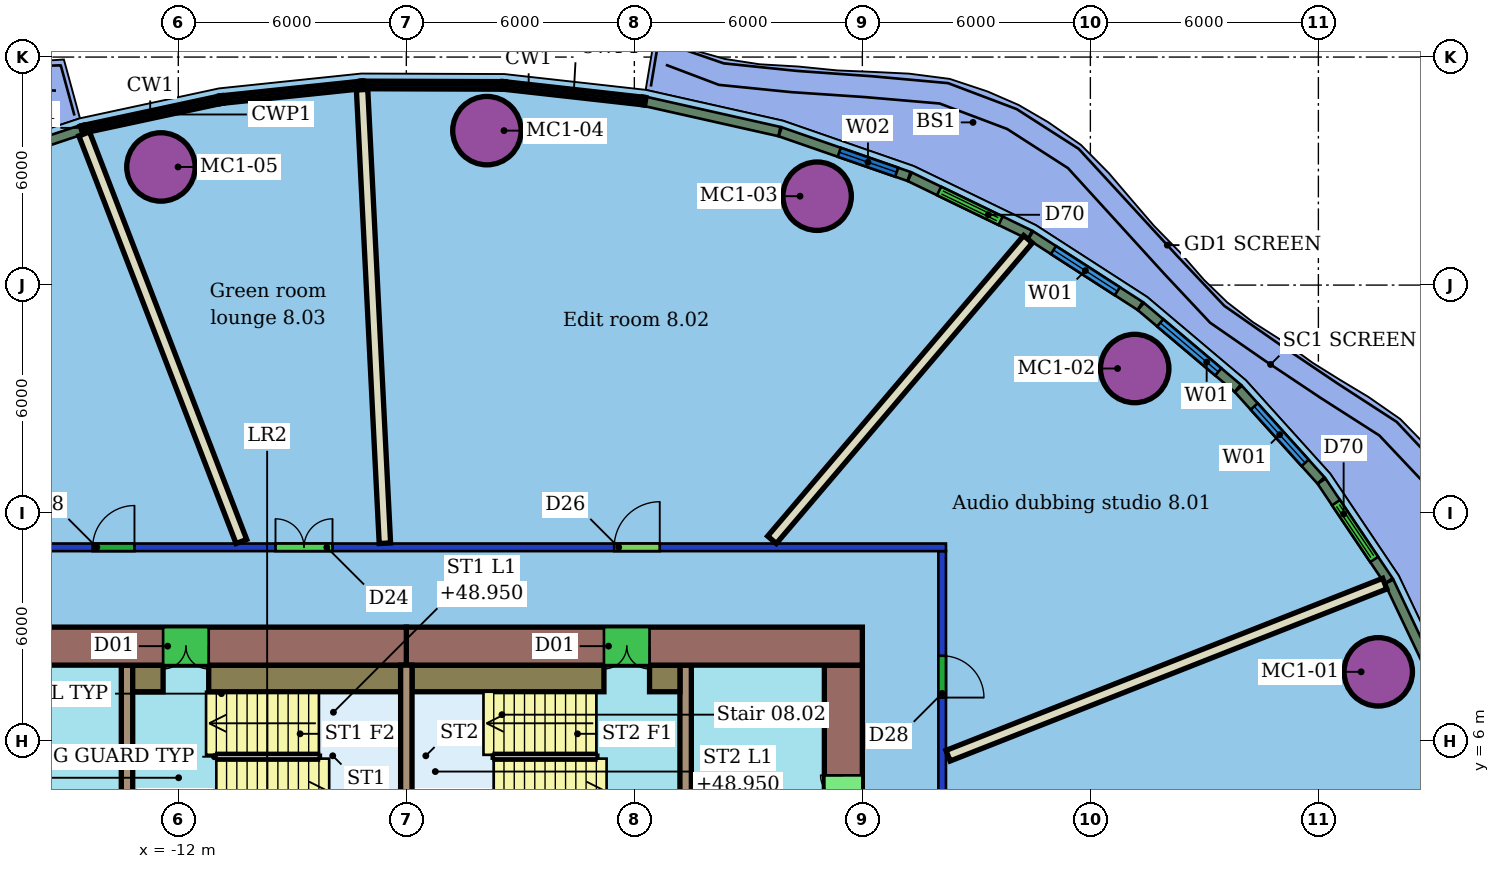
"""IFC4 building model, lengths in metres.
Left out: names, types, materials, properties, quantities, classifications, styles, units other than length and angle.
Written with IfcOpenShell. Run it as: python <this file> out.ifc"""

import sys

from ifc_helpers import new_model, si_unit, direction, frame, frame_2d, origin, origin_2d, place, context, subcontext, project, spatial, rectangle, hollow_circle, extrude, element, fill, save


model = new_model("IFC4")
c1 = context("Model", 3, precision=1e-05, world=origin(), true_north=direction((0.0, 1.0)))
c2 = subcontext(c1, "Body", "Model", "MODEL_VIEW")
j1 = project(units=[si_unit("LENGTHUNIT", "METRE"), si_unit("PLANEANGLEUNIT", "RADIAN")], contexts=[c1])
p1 = place(None, origin())
s1 = spatial("IfcSite", under=j1, at=p1, CompositionType="ELEMENT")
p2 = place(p1, origin())
s2 = spatial("IfcBuilding", under=s1, at=p2, CompositionType="ELEMENT")
p3 = place(p2, frame((0.0, 0.0, 47.1)))
s3 = spatial("IfcBuildingStorey", under=s2, at=p3, CompositionType="ELEMENT", Elevation=47.1)
for number, where, z_axis, x_axis in (
    (1, (19.575, 7.824, 0.0), (0.0, 0.0, 1.0), (1.0, 0.0, 0.0)),
    (2, (13.166, 15.805, 0.0), (0.0, 0.0, 1.0), (1.0, 0.0, 0.0)),
    (3, (4.81, 20.339, 0.0), (0.0, 0.0, 1.0), (1.0, 0.0, 0.0)),
    (4, (-3.879, 22.064, 0.0), (0.0, 0.0, 1.0), (1.0, 0.0, 0.0)),
    (5, (-12.458, 21.108, 0.0), (0.0, 0.0, 1.0), (1.0, 0.0, 0.0)),
):
    element("IfcColumn", number, at=place(p3, frame(where, z_axis=z_axis, x_axis=x_axis)), inside=s3, PredefinedType="COLUMN", context=c2, shape_type="SweptSolid", body=[
        extrude(hollow_circle(Radius=0.9, WallThickness=0.06, at=origin_2d()), origin(), (0.0, 0.0, 1.0), 3.55),
    ])
p4 = place(p3, frame((-20.2, 11.1, 0.0), z_axis=(0.0, 0.0, 1.0), x_axis=(1.0, 0.0, 0.0)))
e6 = element("IfcWall", 6, at=p4, inside=s3, PredefinedType="PARTITIONING", context=c2, shape_type="SweptSolid", body=[
    extrude(rectangle(XDim=28.4, YDim=0.2, at=frame_2d((14.2, 0.0))), origin(), (0.0, 0.0, 1.0), 2.85),
])
p5 = place(p4, frame((19.669, 0.0, 0.0)))
e7 = element("IfcOpeningElement", 7, at=p5, cuts=e6, PredefinedType="OPENING", context=c2, shape_type="SweptSolid", body=[
    extrude(rectangle(XDim=1.2, YDim=2.1, at=frame_2d((0.6, 1.05))), frame((0.0, 0.11, 0.0), z_axis=(0.0, -1.0, 0.0), x_axis=(1.0, 0.0, 0.0)), (0.0, 0.0, 1.0), 0.22),
])
p6 = place(p4, frame((10.757, 0.0, 0.0)))
e8 = element("IfcOpeningElement", 8, at=p6, cuts=e6, PredefinedType="OPENING", context=c2, shape_type="SweptSolid", body=[
    extrude(rectangle(XDim=1.5, YDim=2.1, at=frame_2d((0.75, 1.05))), frame((0.0, 0.11, 0.0), z_axis=(0.0, -1.0, 0.0), x_axis=(1.0, 0.0, 0.0)), (0.0, 0.0, 1.0), 0.22),
])
p7 = place(p4, frame((5.946, 0.0, 0.0)))
e9 = element("IfcOpeningElement", 9, at=p7, cuts=e6, PredefinedType="OPENING", context=c2, shape_type="SweptSolid", body=[
    extrude(rectangle(XDim=1.1, YDim=2.1, at=frame_2d((0.55, 1.05))), frame((0.0, 0.11, 0.0), z_axis=(0.0, -1.0, 0.0), x_axis=(1.0, 0.0, 0.0)), (0.0, 0.0, 1.0), 0.22),
])
p8 = place(p3, frame((8.1, 11.0, 0.0), z_axis=(0.0, 0.0, 1.0), x_axis=(0.0, -1.0, 0.0)))
e10 = element("IfcWall", 10, at=p8, inside=s3, PredefinedType="PARTITIONING", context=c2, shape_type="SweptSolid", body=[
    extrude(rectangle(XDim=22.0, YDim=0.2, at=frame_2d((11.0, 0.0))), origin(), (0.0, 0.0, 1.0), 2.85),
])
p9 = place(p8, frame((2.753, 0.0, 0.0)))
e11 = element("IfcOpeningElement", 11, at=p9, cuts=e10, PredefinedType="OPENING", context=c2, shape_type="SweptSolid", body=[
    extrude(rectangle(XDim=1.1, YDim=2.1, at=frame_2d((0.55, 1.05))), frame((0.0, 0.11, 0.0), z_axis=(0.0, -1.0, 0.0), x_axis=(1.0, 0.0, 0.0)), (0.0, 0.0, 1.0), 0.22),
])
p10 = place(p8, frame((15.639, 0.0, 0.0)))
e12 = element("IfcOpeningElement", 12, at=p10, cuts=e10, PredefinedType="OPENING", context=c2, shape_type="SweptSolid", body=[
    extrude(rectangle(XDim=1.8, YDim=2.1, at=frame_2d((0.9, 1.05))), frame((0.0, 0.11, 0.0), z_axis=(0.0, -1.0, 0.0), x_axis=(1.0, 0.0, 0.0)), (0.0, 0.0, 1.0), 0.22),
])
p11 = place(p8, frame((7.72, 0.0, 0.0)))
e13 = element("IfcOpeningElement", 13, at=p11, cuts=e10, PredefinedType="OPENING", context=c2, shape_type="SweptSolid", body=[
    extrude(rectangle(XDim=0.9, YDim=2.1, at=frame_2d((0.45, 1.05))), frame((0.0, 0.11, 0.0), z_axis=(0.0, -1.0, 0.0), x_axis=(1.0, 0.0, 0.0)), (0.0, 0.0, 1.0), 0.22),
])
p12 = place(p3, frame((19.747, 10.144, 0.0), z_axis=(0.0, 0.0, 1.0), x_axis=(-0.930393072446, -0.366563406172, 0.0)))
e14 = element("IfcWall", 14, at=p12, inside=s3, PredefinedType="PARTITIONING", context=c2, shape_type="SweptSolid", body=[
    extrude(rectangle(XDim=12.352, YDim=0.3, at=frame_2d((6.176, 0.0))), origin(), (0.0, 0.0, 1.0), 3.55),
])
p13 = place(p3, frame((10.359, 19.206, 0.0), z_axis=(0.0, 0.0, 1.0), x_axis=(-0.648427112799, -0.76127674297, 0.0)))
e15 = element("IfcWall", 15, at=p13, inside=s3, PredefinedType="PARTITIONING", context=c2, shape_type="SweptSolid", body=[
    extrude(rectangle(XDim=10.389, YDim=0.3, at=frame_2d((5.194, 0.0))), origin(), (0.0, 0.0, 1.0), 3.55),
])
p14 = place(p3, frame((-7.164, 23.142, 0.0), z_axis=(0.0, 0.0, 1.0), x_axis=(0.050261666174, -0.998736083714, 0.0)))
e16 = element("IfcWall", 16, at=p14, inside=s3, PredefinedType="PARTITIONING", context=c2, shape_type="SweptSolid", body=[
    extrude(rectangle(XDim=11.949, YDim=0.3, at=frame_2d((5.975, 0.0))), origin(), (0.0, 0.0, 1.0), 3.55),
])
p15 = place(p3, frame((-14.477, 21.979, 0.0), z_axis=(0.0, 0.0, 1.0), x_axis=(0.359841429266, -0.933013475671, 0.0)))
e17 = element("IfcWall", 17, at=p15, inside=s3, PredefinedType="PARTITIONING", context=c2, shape_type="SweptSolid", body=[
    extrude(rectangle(XDim=11.495, YDim=0.3, at=frame_2d((5.747, 0.0))), origin(), (0.0, 0.0, 1.0), 3.55),
])
p16 = place(p3, frame((21.168, 7.439, 0.0), z_axis=(0.0, 0.0, 1.0), x_axis=(-0.428609341076, 0.903489918451, 0.0)))
e18 = element("IfcWall", 18, at=p16, inside=s3, PredefinedType="SOLIDWALL", context=c2, shape_type="SweptSolid", body=[
    extrude(rectangle(XDim=3.05, YDim=0.25, at=frame_2d((1.525, 0.0))), origin(), (0.0, 0.0, 1.0), 3.15),
])
p17 = place(p3, frame((19.848, 10.217, 0.0), z_axis=(0.0, 0.0, 1.0), x_axis=(-0.558028768247, 0.829821603605, 0.0)))
e19 = element("IfcWall", 19, at=p17, inside=s3, PredefinedType="SOLIDWALL", context=c2, shape_type="SweptSolid", body=[
    extrude(rectangle(XDim=3.161, YDim=0.25, at=frame_2d((1.581, 0.0))), origin(), (0.0, 0.0, 1.0), 3.15),
])
p18 = place(p17, frame((0.68, 0.0, 0.0)))
e20 = element("IfcOpeningElement", 20, at=p18, cuts=e19, PredefinedType="OPENING", context=c2, shape_type="SweptSolid", body=[
    extrude(rectangle(XDim=1.8, YDim=2.4, at=frame_2d((0.9, 1.2))), frame((0.0, 0.135, 0.0), z_axis=(0.0, -1.0, 0.0), x_axis=(1.0, 0.0, 0.0)), (0.0, 0.0, 1.0), 0.27),
])
p19 = place(p3, frame((18.068, 12.861, 0.0), z_axis=(0.0, 0.0, 1.0), x_axis=(-0.670103092784, 0.742268041237, 0.0)))
e21 = element("IfcWall", 21, at=p19, inside=s3, PredefinedType="SOLIDWALL", context=c2, shape_type="SweptSolid", body=[
    extrude(rectangle(XDim=3.244, YDim=0.25, at=frame_2d((1.622, 0.0))), origin(), (0.0, 0.0, 1.0), 3.15),
])
p20 = place(p19, frame((0.622, 0.0, 0.8)))
e22 = element("IfcOpeningElement", 22, at=p20, cuts=e21, PredefinedType="OPENING", context=c2, shape_type="SweptSolid", body=[
    extrude(rectangle(XDim=2.0, YDim=2.2, at=frame_2d((1.0, 1.1))), frame((0.0, 0.135, 0.0), z_axis=(0.0, -1.0, 0.0), x_axis=(1.0, 0.0, 0.0)), (0.0, 0.0, 1.0), 0.27),
])
p21 = place(p3, frame((15.876, 15.286, 0.0), z_axis=(0.0, 0.0, 1.0), x_axis=(-0.764082841582, 0.645118137398, 0.0)))
e23 = element("IfcWall", 23, at=p21, inside=s3, PredefinedType="SOLIDWALL", context=c2, shape_type="SweptSolid", body=[
    extrude(rectangle(XDim=3.335, YDim=0.25, at=frame_2d((1.667, 0.0))), origin(), (0.0, 0.0, 1.0), 3.15),
])
p22 = place(p21, frame((0.667, 0.0, 0.8)))
e24 = element("IfcOpeningElement", 24, at=p22, cuts=e23, PredefinedType="OPENING", context=c2, shape_type="SweptSolid", body=[
    extrude(rectangle(XDim=2.0, YDim=2.2, at=frame_2d((1.0, 1.1))), frame((0.0, 0.135, 0.0), z_axis=(0.0, -1.0, 0.0), x_axis=(1.0, 0.0, 0.0)), (0.0, 0.0, 1.0), 0.27),
])
p23 = place(p3, frame((13.309, 17.452, 0.0), z_axis=(0.0, 0.0, 1.0), x_axis=(-0.840374130765, 0.54200675304, 0.0)))
e25 = element("IfcWall", 25, at=p23, inside=s3, PredefinedType="SOLIDWALL", context=c2, shape_type="SweptSolid", body=[
    extrude(rectangle(XDim=3.426, YDim=0.25, at=frame_2d((1.713, 0.0))), origin(), (0.0, 0.0, 1.0), 3.15),
])
p24 = place(p23, frame((0.713, 0.0, 0.8)))
e26 = element("IfcOpeningElement", 26, at=p24, cuts=e25, PredefinedType="OPENING", context=c2, shape_type="SweptSolid", body=[
    extrude(rectangle(XDim=2.0, YDim=2.2, at=frame_2d((1.0, 1.1))), frame((0.0, 0.135, 0.0), z_axis=(0.0, -1.0, 0.0), x_axis=(1.0, 0.0, 0.0)), (0.0, 0.0, 1.0), 0.27),
])
p25 = place(p3, frame((10.409, 19.32, 0.0), z_axis=(0.0, 0.0, 1.0), x_axis=(-0.900150457919, 0.435579100862, 0.0)))
e27 = element("IfcWall", 27, at=p25, inside=s3, PredefinedType="SOLIDWALL", context=c2, shape_type="SweptSolid", body=[
    extrude(rectangle(XDim=3.511, YDim=0.25, at=frame_2d((1.756, 0.0))), origin(), (0.0, 0.0, 1.0), 3.15),
])
p26 = place(p25, frame((0.856, 0.0, 0.0)))
e28 = element("IfcOpeningElement", 28, at=p26, cuts=e27, PredefinedType="OPENING", context=c2, shape_type="SweptSolid", body=[
    extrude(rectangle(XDim=1.8, YDim=2.4, at=frame_2d((0.9, 1.2))), frame((0.0, 0.135, 0.0), z_axis=(0.0, -1.0, 0.0), x_axis=(1.0, 0.0, 0.0)), (0.0, 0.0, 1.0), 0.27),
])
p27 = place(p3, frame((7.227, 20.858, 0.0), z_axis=(0.0, 0.0, 1.0), x_axis=(-0.944816817468, 0.327599116956, 0.0)))
e29 = element("IfcWall", 29, at=p27, inside=s3, PredefinedType="SOLIDWALL", context=c2, shape_type="SweptSolid", body=[
    extrude(rectangle(XDim=3.587, YDim=0.25, at=frame_2d((1.793, 0.0))), origin(), (0.0, 0.0, 1.0), 3.15),
])
p28 = place(p27, frame((0.343, 0.0, 0.8)))
e30 = element("IfcOpeningElement", 30, at=p28, cuts=e29, PredefinedType="OPENING", context=c2, shape_type="SweptSolid", body=[
    extrude(rectangle(XDim=1.6, YDim=2.2, at=frame_2d((0.8, 1.1))), frame((0.0, 0.135, 0.0), z_axis=(0.0, -1.0, 0.0), x_axis=(1.0, 0.0, 0.0)), (0.0, 0.0, 1.0), 0.27),
])
p29 = place(p3, frame((3.817, 22.04, 0.0), z_axis=(0.0, 0.0, 1.0), x_axis=(-0.975672486329, 0.21923320784, 0.0)))
e31 = element("IfcWall", 31, at=p29, inside=s3, PredefinedType="SOLIDWALL", context=c2, shape_type="SweptSolid", body=[
    extrude(rectangle(XDim=3.603, YDim=0.25, at=frame_2d((1.801, 0.0))), origin(), (0.0, 0.0, 1.0), 3.15),
])
p30 = place(p3, frame((-14.562, 22.082, 0.0), z_axis=(0.0, 0.0, 1.0), x_axis=(-0.948744266755, -0.316044801096, 0.0)))
e32 = element("IfcWall", 32, at=p30, inside=s3, PredefinedType="SOLIDWALL", context=c2, shape_type="SweptSolid", body=[
    extrude(rectangle(XDim=3.603, YDim=0.25, at=frame_2d((1.801, 0.0))), origin(), (0.0, 0.0, 1.0), 3.15),
])
p31 = place(p3, frame((6.0, 8.5, 0.0), z_axis=(0.0, 0.0, 1.0), x_axis=(-1.0, 0.0, 0.0)))
e33 = element("IfcWall", 33, at=p31, inside=s3, PredefinedType="SHEAR", context=c2, shape_type="SweptSolid", body=[
    extrude(rectangle(XDim=12.0, YDim=1.0, at=frame_2d((6.0, 0.0))), origin(), (0.0, 0.0, 1.0), 3.4),
])
p32 = place(p31, frame((5.6, 0.0, 0.0)))
e34 = element("IfcOpeningElement", 34, at=p32, cuts=e33, PredefinedType="OPENING", context=c2, shape_type="SweptSolid", body=[
    extrude(rectangle(XDim=1.2, YDim=2.1, at=frame_2d((0.6, 1.05))), frame((0.0, 0.51, 0.0), z_axis=(0.0, -1.0, 0.0), x_axis=(1.0, 0.0, 0.0)), (0.0, 0.0, 1.0), 1.02),
])
p33 = place(p3, frame((-6.0, 8.5, 0.0), z_axis=(0.0, 0.0, 1.0), x_axis=(-1.0, 0.0, 0.0)))
e35 = element("IfcWall", 35, at=p33, inside=s3, PredefinedType="SHEAR", context=c2, shape_type="SweptSolid", body=[
    extrude(rectangle(XDim=12.0, YDim=1.0, at=frame_2d((6.0, 0.0))), origin(), (0.0, 0.0, 1.0), 3.4),
])
p34 = place(p33, frame((5.2, 0.0, 0.0)))
e36 = element("IfcOpeningElement", 36, at=p34, cuts=e35, PredefinedType="OPENING", context=c2, shape_type="SweptSolid", body=[
    extrude(rectangle(XDim=1.2, YDim=2.1, at=frame_2d((0.6, 1.05))), frame((0.0, 0.51, 0.0), z_axis=(0.0, -1.0, 0.0), x_axis=(1.0, 0.0, 0.0)), (0.0, 0.0, 1.0), 1.02),
])
p35 = place(p3, frame((5.5, -8.0, 0.0), z_axis=(0.0, 0.0, 1.0), x_axis=(0.0, 1.0, 0.0)))
e37 = element("IfcWall", 37, at=p35, inside=s3, PredefinedType="SHEAR", context=c2, shape_type="SweptSolid", body=[
    extrude(rectangle(XDim=16.0, YDim=1.0, at=frame_2d((8.0, 0.0))), origin(), (0.0, 0.0, 1.0), 3.4),
])
p36 = place(p35, frame((2.9, 0.0, 0.0)))
e38 = element("IfcOpeningElement", 38, at=p36, cuts=e37, PredefinedType="OPENING", context=c2, shape_type="SweptSolid", body=[
    extrude(rectangle(XDim=1.2, YDim=2.1, at=frame_2d((0.6, 1.05))), frame((0.0, 0.51, 0.0), z_axis=(0.0, -1.0, 0.0), x_axis=(1.0, 0.0, 0.0)), (0.0, 0.0, 1.0), 1.02),
])
p37 = place(p35, frame((11.9, 0.0, 0.0)))
e39 = element("IfcOpeningElement", 39, at=p37, cuts=e37, PredefinedType="OPENING", context=c2, shape_type="SweptSolid", body=[
    extrude(rectangle(XDim=1.2, YDim=2.1, at=frame_2d((0.6, 1.05))), frame((0.0, 0.51, 0.0), z_axis=(0.0, -1.0, 0.0), x_axis=(1.0, 0.0, 0.0)), (0.0, 0.0, 1.0), 1.02),
])
p38 = place(p3, frame((-13.35, 8.0, 0.0), z_axis=(0.0, 0.0, 1.0), x_axis=(0.0, -1.0, 0.0)))
e40 = element("IfcWall", 40, at=p38, inside=s3, PredefinedType="SHEAR", context=c2, shape_type="SweptSolid", body=[
    extrude(rectangle(XDim=16.0, YDim=0.3, at=frame_2d((8.0, 0.0))), origin(), (0.0, 0.0, 1.0), 3.4),
])
p39 = place(p38, frame((7.25, 0.0, 0.0)))
e41 = element("IfcOpeningElement", 41, at=p39, cuts=e40, PredefinedType="OPENING", context=c2, shape_type="SweptSolid", body=[
    extrude(rectangle(XDim=1.5, YDim=2.1, at=frame_2d((0.75, 1.05))), frame((0.0, 0.16, 0.0), z_axis=(0.0, -1.0, 0.0), x_axis=(1.0, 0.0, 0.0)), (0.0, 0.0, 1.0), 0.32),
])
p40 = place(p3, frame((1.35, -8.0, 0.0), z_axis=(0.0, 0.0, 1.0), x_axis=(0.0, 1.0, 0.0)))
e42 = element("IfcWall", 42, at=p40, inside=s3, PredefinedType="SHEAR", context=c2, shape_type="SweptSolid", body=[
    extrude(rectangle(XDim=16.0, YDim=0.3, at=frame_2d((8.0, 0.0))), origin(), (0.0, 0.0, 1.0), 3.4),
])
p41 = place(p40, frame((1.91, 0.0, 0.0)))
e43 = element("IfcOpeningElement", 43, at=p41, cuts=e42, PredefinedType="OPENING", context=c2, shape_type="SweptSolid", body=[
    extrude(rectangle(XDim=1.0, YDim=2.1, at=frame_2d((0.5, 1.05))), frame((0.0, 0.16, 0.0), z_axis=(0.0, -1.0, 0.0), x_axis=(1.0, 0.0, 0.0)), (0.0, 0.0, 1.0), 0.32),
])
p42 = place(p40, frame((7.25, 0.0, 0.0)))
e44 = element("IfcOpeningElement", 44, at=p42, cuts=e42, PredefinedType="OPENING", context=c2, shape_type="SweptSolid", body=[
    extrude(rectangle(XDim=1.5, YDim=2.1, at=frame_2d((0.75, 1.05))), frame((0.0, 0.16, 0.0), z_axis=(0.0, -1.0, 0.0), x_axis=(1.0, 0.0, 0.0)), (0.0, 0.0, 1.0), 0.32),
])
p43 = place(p3, frame((-6.0, 3.88, 0.0), z_axis=(0.0, 0.0, 1.0), x_axis=(0.0, 1.0, 0.0)))
e45 = element("IfcWall", 45, at=p43, inside=s3, PredefinedType="SHEAR", context=c2, shape_type="SweptSolid", body=[
    extrude(rectangle(XDim=4.12, YDim=0.3, at=frame_2d((2.06, 0.0))), origin(), (0.0, 0.0, 1.0), 3.4),
])
p44 = place(p3, frame((-13.2, 7.65, 0.0), z_axis=(0.0, 0.0, 1.0), x_axis=(1.0, 0.0, 0.0)))
e46 = element("IfcWall", 46, at=p44, inside=s3, PredefinedType="SHEAR", context=c2, shape_type="SweptSolid", body=[
    extrude(rectangle(XDim=0.8, YDim=0.7, at=frame_2d((0.4, 0.0))), origin(), (0.0, 0.0, 1.0), 3.4),
])
for number, where, z_axis, x_axis in (
    (47, (-11.2, 7.65, 0.0), (0.0, 0.0, 1.0), (1.0, 0.0, 0.0)),
    (48, (-5.85, 7.65, 0.0), (0.0, 0.0, 1.0), (1.0, 0.0, 0.0)),
):
    element("IfcWall", number, at=place(p3, frame(where, z_axis=z_axis, x_axis=x_axis)), inside=s3, PredefinedType="SHEAR", context=c2, shape_type="SweptSolid", body=[
        extrude(rectangle(XDim=5.05, YDim=0.7, at=frame_2d((2.525, 0.0))), origin(), (0.0, 0.0, 1.0), 3.4),
    ])
p45 = place(p3, frame((0.4, 7.65, 0.0), z_axis=(0.0, 0.0, 1.0), x_axis=(1.0, 0.0, 0.0)))
e49 = element("IfcWall", 49, at=p45, inside=s3, PredefinedType="SHEAR", context=c2, shape_type="SweptSolid", body=[
    extrude(rectangle(XDim=0.8, YDim=0.7, at=frame_2d((0.4, 0.0))), origin(), (0.0, 0.0, 1.0), 3.4),
])
p46 = place(p9, origin())
e50 = element("IfcDoor", 50, at=p46, inside=s3, OperationType="SINGLE_SWING_RIGHT", PredefinedType="DOOR", context=c2, shape_type="SweptSolid", body=[
    extrude(rectangle(XDim=1.1, YDim=2.1, at=frame_2d((0.55, 1.05))), frame((0.0, 0.025, 0.0), z_axis=(0.0, -1.0, 0.0), x_axis=(1.0, 0.0, 0.0)), (0.0, 0.0, 1.0), 0.05),
])
fill(e11, e50)
p47 = place(p5, origin())
e51 = element("IfcDoor", 51, at=p47, inside=s3, OperationType="SINGLE_SWING_RIGHT", PredefinedType="DOOR", context=c2, shape_type="SweptSolid", body=[
    extrude(rectangle(XDim=1.2, YDim=2.1, at=frame_2d((0.6, 1.05))), frame((0.0, 0.025, 0.0), z_axis=(0.0, -1.0, 0.0), x_axis=(1.0, 0.0, 0.0)), (0.0, 0.0, 1.0), 0.05),
])
fill(e7, e51)
p48 = place(p6, origin())
e52 = element("IfcDoor", 52, at=p48, inside=s3, OperationType="DOUBLE_DOOR_SINGLE_SWING", PredefinedType="DOOR", context=c2, shape_type="SweptSolid", body=[
    extrude(rectangle(XDim=1.5, YDim=2.1, at=frame_2d((0.75, 1.05))), frame((0.0, 0.025, 0.0), z_axis=(0.0, -1.0, 0.0), x_axis=(1.0, 0.0, 0.0)), (0.0, 0.0, 1.0), 0.05),
])
fill(e8, e52)
p49 = place(p7, origin())
e53 = element("IfcDoor", 53, at=p49, inside=s3, OperationType="SINGLE_SWING_RIGHT", PredefinedType="DOOR", context=c2, shape_type="SweptSolid", body=[
    extrude(rectangle(XDim=1.1, YDim=2.1, at=frame_2d((0.55, 1.05))), frame((0.0, 0.025, 0.0), z_axis=(0.0, -1.0, 0.0), x_axis=(1.0, 0.0, 0.0)), (0.0, 0.0, 1.0), 0.05),
])
fill(e9, e53)
p50 = place(p18, origin())
e54 = element("IfcDoor", 54, at=p50, inside=s3, OperationType="DOUBLE_DOOR_SLIDING", PredefinedType="DOOR", context=c2, shape_type="SweptSolid", body=[
    extrude(rectangle(XDim=1.8, YDim=2.4, at=frame_2d((0.9, 1.2))), frame((0.0, 0.025, 0.0), z_axis=(0.0, -1.0, 0.0), x_axis=(1.0, 0.0, 0.0)), (0.0, 0.0, 1.0), 0.05),
])
fill(e20, e54)
p51 = place(p20, origin())
e55 = element("IfcWindow", 55, at=p51, inside=s3, PartitioningType="SINGLE_PANEL", PredefinedType="WINDOW", context=c2, shape_type="SweptSolid", body=[
    extrude(rectangle(XDim=2.0, YDim=2.2, at=frame_2d((1.0, 1.1))), frame((0.0, 0.03, 0.0), z_axis=(0.0, -1.0, 0.0), x_axis=(1.0, 0.0, 0.0)), (0.0, 0.0, 1.0), 0.06),
])
fill(e22, e55)
p52 = place(p22, origin())
e56 = element("IfcWindow", 56, at=p52, inside=s3, PartitioningType="SINGLE_PANEL", PredefinedType="WINDOW", context=c2, shape_type="SweptSolid", body=[
    extrude(rectangle(XDim=2.0, YDim=2.2, at=frame_2d((1.0, 1.1))), frame((0.0, 0.03, 0.0), z_axis=(0.0, -1.0, 0.0), x_axis=(1.0, 0.0, 0.0)), (0.0, 0.0, 1.0), 0.06),
])
fill(e24, e56)
p53 = place(p24, origin())
e57 = element("IfcWindow", 57, at=p53, inside=s3, PartitioningType="SINGLE_PANEL", PredefinedType="WINDOW", context=c2, shape_type="SweptSolid", body=[
    extrude(rectangle(XDim=2.0, YDim=2.2, at=frame_2d((1.0, 1.1))), frame((0.0, 0.03, 0.0), z_axis=(0.0, -1.0, 0.0), x_axis=(1.0, 0.0, 0.0)), (0.0, 0.0, 1.0), 0.06),
])
fill(e26, e57)
p54 = place(p26, origin())
e58 = element("IfcDoor", 58, at=p54, inside=s3, OperationType="DOUBLE_DOOR_SLIDING", PredefinedType="DOOR", context=c2, shape_type="SweptSolid", body=[
    extrude(rectangle(XDim=1.8, YDim=2.4, at=frame_2d((0.9, 1.2))), frame((0.0, 0.025, 0.0), z_axis=(0.0, -1.0, 0.0), x_axis=(1.0, 0.0, 0.0)), (0.0, 0.0, 1.0), 0.05),
])
fill(e28, e58)
p55 = place(p28, origin())
e59 = element("IfcWindow", 59, at=p55, inside=s3, PartitioningType="SINGLE_PANEL", PredefinedType="WINDOW", context=c2, shape_type="SweptSolid", body=[
    extrude(rectangle(XDim=1.6, YDim=2.2, at=frame_2d((0.8, 1.1))), frame((0.0, 0.03, 0.0), z_axis=(0.0, -1.0, 0.0), x_axis=(1.0, 0.0, 0.0)), (0.0, 0.0, 1.0), 0.06),
])
fill(e30, e59)
p56 = place(p32, origin())
e60 = element("IfcDoor", 60, at=p56, inside=s3, OperationType="DOUBLE_DOOR_SINGLE_SWING", PredefinedType="NOTDEFINED", context=c2, shape_type="SweptSolid", body=[
    extrude(rectangle(XDim=1.2, YDim=2.1, at=frame_2d((0.6, 1.05))), frame((0.0, 0.025, 0.0), z_axis=(0.0, -1.0, 0.0), x_axis=(1.0, 0.0, 0.0)), (0.0, 0.0, 1.0), 0.05),
])
fill(e34, e60)
p57 = place(p34, origin())
e61 = element("IfcDoor", 61, at=p57, inside=s3, OperationType="DOUBLE_DOOR_SINGLE_SWING", PredefinedType="NOTDEFINED", context=c2, shape_type="SweptSolid", body=[
    extrude(rectangle(XDim=1.2, YDim=2.1, at=frame_2d((0.6, 1.05))), frame((0.0, 0.025, 0.0), z_axis=(0.0, -1.0, 0.0), x_axis=(1.0, 0.0, 0.0)), (0.0, 0.0, 1.0), 0.05),
])
fill(e36, e61)
p58 = place(p37, origin())
e62 = element("IfcDoor", 62, at=p58, inside=s3, OperationType="DOUBLE_DOOR_SINGLE_SWING", PredefinedType="NOTDEFINED", context=c2, shape_type="SweptSolid", body=[
    extrude(rectangle(XDim=1.2, YDim=2.1, at=frame_2d((0.6, 1.05))), frame((0.0, 0.025, 0.0), z_axis=(0.0, -1.0, 0.0), x_axis=(1.0, 0.0, 0.0)), (0.0, 0.0, 1.0), 0.05),
])
fill(e39, e62)
save(model, sys.argv[1])
